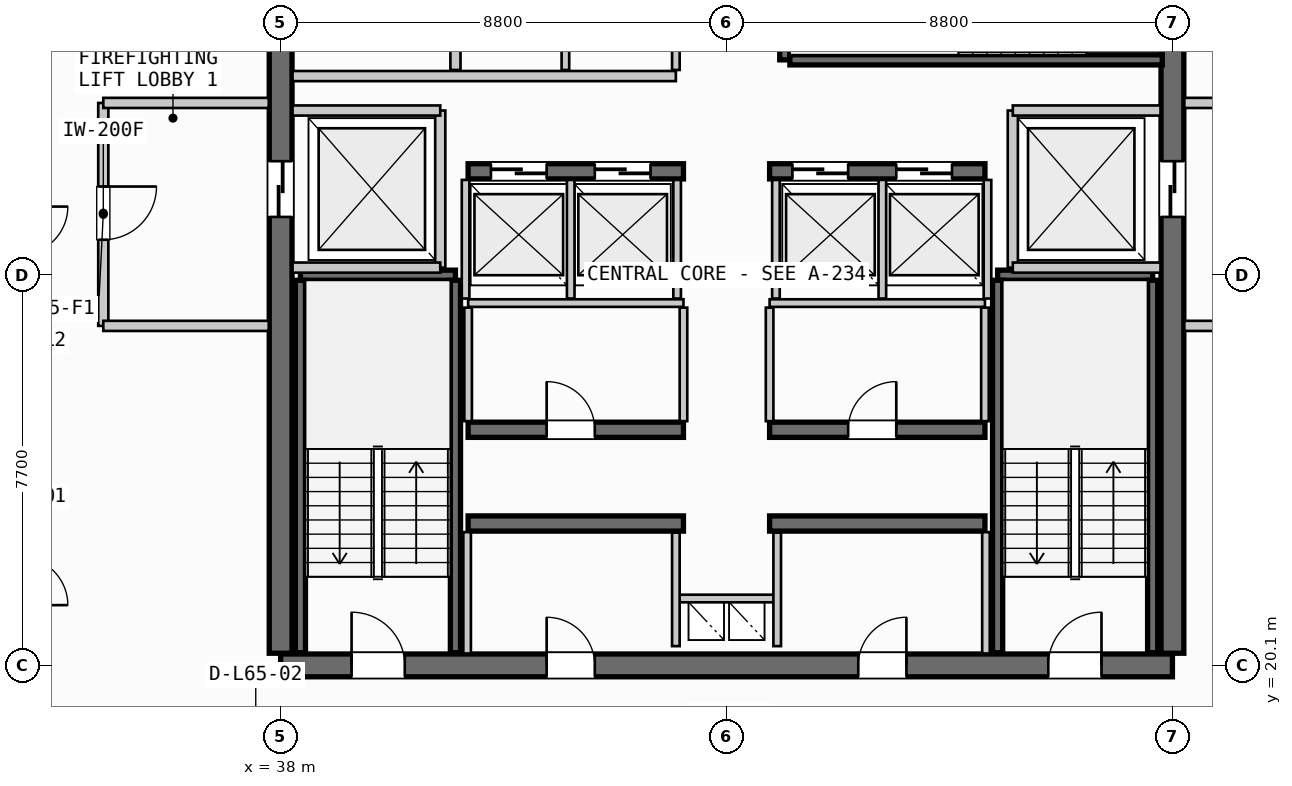
"""IFC4 building model, lengths in metres.
Left out: names, types, materials, properties, quantities, classifications, styles, units other than length and angle.
Written with IfcOpenShell. Run it as: python <this file> out.ifc"""

import sys

from ifc_helpers import new_model, si_unit, direction, frame, frame_2d, origin, place, context, subcontext, project, spatial, rectangle, extrude, source, transform, mapped, element, fill, save


model = new_model("IFC4")
c1 = context("Model", 3, precision=1e-05, world=origin(), true_north=direction((0.0, 1.0)))
c2 = subcontext(c1, "Body", "Model", "MODEL_VIEW")
j1 = project(units=[si_unit("LENGTHUNIT", "METRE"), si_unit("PLANEANGLEUNIT", "RADIAN")], contexts=[c1])
p1 = place(None, origin())
s1 = spatial("IfcSite", under=j1, at=p1, CompositionType="ELEMENT")
p2 = place(p1, origin())
s2 = spatial("IfcBuilding", under=s1, at=p2, CompositionType="ELEMENT")
p3 = place(p2, frame((0.0, 0.0, 249.1)))
s3 = spatial("IfcBuildingStorey", under=s2, at=p3, CompositionType="ELEMENT", Elevation=249.1)
p4 = place(p3, frame((38.0, 20.1, 0.0), z_axis=(0.0, 0.0, 1.0), x_axis=(1.0, 0.0, 0.0)))
e1 = element("IfcWall", 1, at=p4, inside=s3, PredefinedType="SHEAR", context=c2, shape_type="SweptSolid", body=[
    extrude(rectangle(XDim=17.6, YDim=0.45, at=frame_2d((8.8, 0.0))), origin(), (0.0, 0.0, 1.0), 3.21),
])
p5 = place(p4, frame((1.4, 0.0, 0.0)))
e2 = element("IfcOpeningElement", 2, at=p5, cuts=e1, PredefinedType="OPENING", context=c2, shape_type="SweptSolid", body=[
    extrude(rectangle(XDim=1.05, YDim=2.15, at=frame_2d((0.525, 1.075))), frame((0.0, 0.235, 0.0), z_axis=(0.0, -1.0, 0.0), x_axis=(1.0, 0.0, 0.0)), (0.0, 0.0, 1.0), 0.47),
])
p6 = place(p4, frame((15.15, 0.0, 0.0)))
e3 = element("IfcOpeningElement", 3, at=p6, cuts=e1, PredefinedType="OPENING", context=c2, shape_type="SweptSolid", body=[
    extrude(rectangle(XDim=1.05, YDim=2.15, at=frame_2d((0.525, 1.075))), frame((0.0, 0.235, 0.0), z_axis=(0.0, -1.0, 0.0), x_axis=(1.0, 0.0, 0.0)), (0.0, 0.0, 1.0), 0.47),
])
p7 = place(p4, frame((5.25, 0.0, 0.0)))
e4 = element("IfcOpeningElement", 4, at=p7, cuts=e1, PredefinedType="OPENING", context=c2, shape_type="SweptSolid", body=[
    extrude(rectangle(XDim=0.95, YDim=2.15, at=frame_2d((0.475, 1.075))), frame((0.0, 0.235, 0.0), z_axis=(0.0, -1.0, 0.0), x_axis=(1.0, 0.0, 0.0)), (0.0, 0.0, 1.0), 0.47),
])
p8 = place(p4, frame((11.4, 0.0, 0.0)))
e5 = element("IfcOpeningElement", 5, at=p8, cuts=e1, PredefinedType="OPENING", context=c2, shape_type="SweptSolid", body=[
    extrude(rectangle(XDim=0.95, YDim=2.15, at=frame_2d((0.475, 1.075))), frame((0.0, 0.235, 0.0), z_axis=(0.0, -1.0, 0.0), x_axis=(1.0, 0.0, 0.0)), (0.0, 0.0, 1.0), 0.47),
])
p9 = place(p3, frame((38.0, 35.26, 0.0), z_axis=(0.0, 0.0, 1.0), x_axis=(0.0, -1.0, 0.0)))
e6 = element("IfcWall", 6, at=p9, inside=s3, PredefinedType="SHEAR", context=c2, shape_type="SweptSolid", body=[
    extrude(rectangle(XDim=14.92, YDim=0.45, at=frame_2d((7.46, 0.0))), origin(), (0.0, 0.0, 1.0), 3.21),
])
p10 = place(p9, frame((5.21, 0.0, 0.0)))
e7 = element("IfcOpeningElement", 7, at=p10, cuts=e6, PredefinedType="OPENING", context=c2, shape_type="SweptSolid", body=[
    extrude(rectangle(XDim=1.1, YDim=2.2, at=frame_2d((0.55, 1.1))), frame((0.0, 0.235, 0.0), z_axis=(0.0, -1.0, 0.0), x_axis=(1.0, 0.0, 0.0)), (0.0, 0.0, 1.0), 0.47),
])
p11 = place(p3, frame((55.6, 20.34, 0.0), z_axis=(0.0, 0.0, 1.0), x_axis=(0.0, 1.0, 0.0)))
e8 = element("IfcWall", 8, at=p11, inside=s3, PredefinedType="SHEAR", context=c2, shape_type="SweptSolid", body=[
    extrude(rectangle(XDim=14.92, YDim=0.45, at=frame_2d((7.46, 0.0))), origin(), (0.0, 0.0, 1.0), 3.21),
])
p12 = place(p11, frame((12.71, 0.0, 0.0)))
e9 = element("IfcOpeningElement", 9, at=p12, cuts=e8, PredefinedType="OPENING", context=c2, shape_type="SweptSolid", body=[
    extrude(rectangle(XDim=1.05, YDim=2.15, at=frame_2d((0.525, 1.075))), frame((0.0, 0.235, 0.0), z_axis=(0.0, -1.0, 0.0), x_axis=(1.0, 0.0, 0.0)), (0.0, 0.0, 1.0), 0.47),
])
p13 = place(p11, frame((8.61, 0.0, 0.0)))
e10 = element("IfcOpeningElement", 10, at=p13, cuts=e8, PredefinedType="OPENING", context=c2, shape_type="SweptSolid", body=[
    extrude(rectangle(XDim=1.1, YDim=2.2, at=frame_2d((0.55, 1.1))), frame((0.0, 0.235, 0.0), z_axis=(0.0, -1.0, 0.0), x_axis=(1.0, 0.0, 0.0)), (0.0, 0.0, 1.0), 0.47),
])
for number, where, z_axis, x_axis in (
    (11, (41.7, 22.9, 0.0), (0.0, 0.0, 1.0), (1.0, 0.0, 0.0)),
    (12, (47.65, 22.9, 0.0), (0.0, 0.0, 1.0), (1.0, 0.0, 0.0)),
):
    element("IfcWall", number, at=place(p3, frame(where, z_axis=z_axis, x_axis=x_axis)), inside=s3, PredefinedType="SHEAR", context=c2, shape_type="SweptSolid", body=[
        extrude(rectangle(XDim=4.25, YDim=0.3, at=frame_2d((2.125, 0.0))), origin(), (0.0, 0.0, 1.0), 3.21),
    ])
p14 = place(p3, frame((41.7, 24.75, 0.0), z_axis=(0.0, 0.0, 1.0), x_axis=(1.0, 0.0, 0.0)))
e13 = element("IfcWall", 13, at=p14, inside=s3, PredefinedType="SHEAR", context=c2, shape_type="SweptSolid", body=[
    extrude(rectangle(XDim=4.25, YDim=0.3, at=frame_2d((2.125, 0.0))), origin(), (0.0, 0.0, 1.0), 3.21),
])
p15 = place(p14, frame((1.55, 0.0, 0.0)))
e14 = element("IfcOpeningElement", 14, at=p15, cuts=e13, PredefinedType="OPENING", context=c2, shape_type="SweptSolid", body=[
    extrude(rectangle(XDim=0.95, YDim=2.15, at=frame_2d((0.475, 1.075))), frame((0.0, 0.16, 0.0), z_axis=(0.0, -1.0, 0.0), x_axis=(1.0, 0.0, 0.0)), (0.0, 0.0, 1.0), 0.32),
])
p16 = place(p3, frame((47.65, 24.75, 0.0), z_axis=(0.0, 0.0, 1.0), x_axis=(1.0, 0.0, 0.0)))
e15 = element("IfcWall", 15, at=p16, inside=s3, PredefinedType="SHEAR", context=c2, shape_type="SweptSolid", body=[
    extrude(rectangle(XDim=4.25, YDim=0.3, at=frame_2d((2.125, 0.0))), origin(), (0.0, 0.0, 1.0), 3.21),
])
p17 = place(p16, frame((1.55, 0.0, 0.0)))
e16 = element("IfcOpeningElement", 16, at=p17, cuts=e15, PredefinedType="OPENING", context=c2, shape_type="SweptSolid", body=[
    extrude(rectangle(XDim=0.95, YDim=2.15, at=frame_2d((0.475, 1.075))), frame((0.0, 0.16, 0.0), z_axis=(0.0, -1.0, 0.0), x_axis=(1.0, 0.0, 0.0)), (0.0, 0.0, 1.0), 0.32),
])
p18 = place(p3, frame((41.7, 29.85, 0.0), z_axis=(0.0, 0.0, 1.0), x_axis=(1.0, 0.0, 0.0)))
e17 = element("IfcWall", 17, at=p18, inside=s3, PredefinedType="SHEAR", context=c2, shape_type="SweptSolid", body=[
    extrude(rectangle(XDim=4.25, YDim=0.3, at=frame_2d((2.125, 0.0))), origin(), (0.0, 0.0, 1.0), 3.21),
])
p19 = place(p18, frame((0.45, 0.0, 0.0)))
e18 = element("IfcOpeningElement", 18, at=p19, cuts=e17, PredefinedType="OPENING", context=c2, shape_type="SweptSolid", body=[
    extrude(rectangle(XDim=1.1, YDim=2.2, at=frame_2d((0.55, 1.1))), frame((0.0, 0.16, 0.0), z_axis=(0.0, -1.0, 0.0), x_axis=(1.0, 0.0, 0.0)), (0.0, 0.0, 1.0), 0.32),
])
p20 = place(p18, frame((2.5, 0.0, 0.0)))
e19 = element("IfcOpeningElement", 19, at=p20, cuts=e17, PredefinedType="OPENING", context=c2, shape_type="SweptSolid", body=[
    extrude(rectangle(XDim=1.1, YDim=2.2, at=frame_2d((0.55, 1.1))), frame((0.0, 0.16, 0.0), z_axis=(0.0, -1.0, 0.0), x_axis=(1.0, 0.0, 0.0)), (0.0, 0.0, 1.0), 0.32),
])
p21 = place(p3, frame((47.65, 29.85, 0.0), z_axis=(0.0, 0.0, 1.0), x_axis=(1.0, 0.0, 0.0)))
e20 = element("IfcWall", 20, at=p21, inside=s3, PredefinedType="SHEAR", context=c2, shape_type="SweptSolid", body=[
    extrude(rectangle(XDim=4.25, YDim=0.3, at=frame_2d((2.125, 0.0))), origin(), (0.0, 0.0, 1.0), 3.21),
])
p22 = place(p21, frame((0.45, 0.0, 0.0)))
e21 = element("IfcOpeningElement", 21, at=p22, cuts=e20, PredefinedType="OPENING", context=c2, shape_type="SweptSolid", body=[
    extrude(rectangle(XDim=1.1, YDim=2.2, at=frame_2d((0.55, 1.1))), frame((0.0, 0.16, 0.0), z_axis=(0.0, -1.0, 0.0), x_axis=(1.0, 0.0, 0.0)), (0.0, 0.0, 1.0), 0.32),
])
p23 = place(p21, frame((2.5, 0.0, 0.0)))
e22 = element("IfcOpeningElement", 22, at=p23, cuts=e20, PredefinedType="OPENING", context=c2, shape_type="SweptSolid", body=[
    extrude(rectangle(XDim=1.1, YDim=2.2, at=frame_2d((0.55, 1.1))), frame((0.0, 0.16, 0.0), z_axis=(0.0, -1.0, 0.0), x_axis=(1.0, 0.0, 0.0)), (0.0, 0.0, 1.0), 0.32),
])
p24 = place(p3, frame((38.39, 27.8, 0.0), z_axis=(0.0, 0.0, 1.0), x_axis=(1.0, 0.0, 0.0)))
e23 = element("IfcWall", 23, at=p24, inside=s3, PredefinedType="SHEAR", context=c2, shape_type="SweptSolid", body=[
    extrude(rectangle(XDim=3.06, YDim=0.2, at=frame_2d((1.53, 0.0))), origin(), (0.0, 0.0, 1.0), 3.21),
])
for number, where, z_axis, x_axis in (
    (24, (41.45, 27.7, 0.0), (0.0, 0.0, 1.0), (0.0, -1.0, 0.0)),
    (25, (38.39, 20.35, 0.0), (0.0, 0.0, 1.0), (0.0, 1.0, 0.0)),
):
    element("IfcWall", number, at=place(p3, frame(where, z_axis=z_axis, x_axis=x_axis)), inside=s3, PredefinedType="SHEAR", context=c2, shape_type="SweptSolid", body=[
        extrude(rectangle(XDim=7.35, YDim=0.2, at=frame_2d((3.675, 0.0))), origin(), (0.0, 0.0, 1.0), 3.21),
    ])
p25 = place(p3, frame((52.15, 27.8, 0.0), z_axis=(0.0, 0.0, 1.0), x_axis=(1.0, 0.0, 0.0)))
e26 = element("IfcWall", 26, at=p25, inside=s3, PredefinedType="SHEAR", context=c2, shape_type="SweptSolid", body=[
    extrude(rectangle(XDim=3.06, YDim=0.2, at=frame_2d((1.53, 0.0))), origin(), (0.0, 0.0, 1.0), 3.21),
])
for number, where, z_axis, x_axis in (
    (27, (55.21, 27.7, 0.0), (0.0, 0.0, 1.0), (0.0, -1.0, 0.0)),
    (28, (52.15, 20.35, 0.0), (0.0, 0.0, 1.0), (0.0, 1.0, 0.0)),
):
    element("IfcWall", number, at=place(p3, frame(where, z_axis=z_axis, x_axis=x_axis)), inside=s3, PredefinedType="SHEAR", context=c2, shape_type="SweptSolid", body=[
        extrude(rectangle(XDim=7.35, YDim=0.2, at=frame_2d((3.675, 0.0))), origin(), (0.0, 0.0, 1.0), 3.21),
    ])
p26 = place(p3, frame((47.95, 32.05, 0.0), z_axis=(0.0, 0.0, 1.0), x_axis=(0.0, 1.0, 0.0)))
e29 = element("IfcWall", 29, at=p26, inside=s3, PredefinedType="SHEAR", context=c2, shape_type="SweptSolid", body=[
    extrude(rectangle(XDim=3.06, YDim=0.2, at=frame_2d((1.53, 0.0))), origin(), (0.0, 0.0, 1.0), 3.21),
])
p27 = place(p3, frame((55.4, 32.05, 0.0), z_axis=(0.0, 0.0, 1.0), x_axis=(-1.0, 0.0, 0.0)))
e30 = element("IfcWall", 30, at=p27, inside=s3, PredefinedType="SHEAR", context=c2, shape_type="SweptSolid", body=[
    extrude(rectangle(XDim=7.35, YDim=0.2, at=frame_2d((3.675, 0.0))), origin(), (0.0, 0.0, 1.0), 3.21),
])
p28 = place(p3, frame((45.8, 21.42, 0.0), z_axis=(0.0, 0.0, 1.0), x_axis=(1.0, 0.0, 0.0)))
e31 = element("IfcWall", 31, at=p28, inside=s3, PredefinedType="PARTITIONING", context=c2, shape_type="SweptSolid", body=[
    extrude(rectangle(XDim=2.0, YDim=0.15, at=frame_2d((1.0, 0.0))), origin(), (0.0, 0.0, 1.0), 2.28),
])
for number, where, z_axis, x_axis in (
    (32, (45.8, 20.48, 0.0), (0.0, 0.0, 1.0), (0.0, 1.0, 0.0)),
    (33, (47.8, 20.48, 0.0), (0.0, 0.0, 1.0), (0.0, 1.0, 0.0)),
):
    element("IfcWall", number, at=place(p3, frame(where, z_axis=z_axis, x_axis=x_axis)), inside=s3, PredefinedType="PARTITIONING", context=c2, shape_type="SweptSolid", body=[
        extrude(rectangle(XDim=2.24, YDim=0.15, at=frame_2d((1.12, 0.0))), origin(), (0.0, 0.0, 1.0), 2.28),
    ])
p29 = place(p3, frame((41.15, 27.95, 0.0), z_axis=(0.0, 0.0, 1.0), x_axis=(0.0, 1.0, 0.0)))
e34 = element("IfcWall", 34, at=p29, inside=s3, PredefinedType="PARTITIONING", context=c2, shape_type="SweptSolid", body=[
    extrude(rectangle(XDim=3.1, YDim=0.2, at=frame_2d((1.55, 0.0))), origin(), (0.0, 0.0, 1.0), 2.28),
])
for number, where, z_axis, x_axis in (
    (35, (38.235, 27.95, 0.0), (0.0, 0.0, 1.0), (1.0, 0.0, 0.0)),
    (36, (38.235, 31.05, 0.0), (0.0, 0.0, 1.0), (1.0, 0.0, 0.0)),
):
    element("IfcWall", number, at=place(p3, frame(where, z_axis=z_axis, x_axis=x_axis)), inside=s3, PredefinedType="PARTITIONING", context=c2, shape_type="SweptSolid", body=[
        extrude(rectangle(XDim=2.915, YDim=0.2, at=frame_2d((1.458, 0.0))), origin(), (0.0, 0.0, 1.0), 2.28),
    ])
p30 = place(p3, frame((34.5, 31.2, 0.0), z_axis=(0.0, 0.0, 1.0), x_axis=(0.0, -1.0, 0.0)))
e37 = element("IfcWall", 37, at=p30, inside=s3, PredefinedType="PARTITIONING", context=c2, shape_type="SweptSolid", body=[
    extrude(rectangle(XDim=4.4, YDim=0.2, at=frame_2d((2.2, 0.0))), origin(), (0.0, 0.0, 1.0), 2.28),
])
p31 = place(p30, frame((1.65, 0.0, 0.0)))
e38 = element("IfcOpeningElement", 38, at=p31, cuts=e37, PredefinedType="OPENING", context=c2, shape_type="SweptSolid", body=[
    extrude(rectangle(XDim=1.05, YDim=2.15, at=frame_2d((0.525, 1.075))), frame((0.0, 0.11, 0.0), z_axis=(0.0, -1.0, 0.0), x_axis=(1.0, 0.0, 0.0)), (0.0, 0.0, 1.0), 0.22),
])
for number, where, z_axis, x_axis in (
    (39, (34.5, 26.8, 0.0), (0.0, 0.0, 1.0), (1.0, 0.0, 0.0)),
    (40, (34.5, 31.2, 0.0), (0.0, 0.0, 1.0), (1.0, 0.0, 0.0)),
):
    element("IfcWall", number, at=place(p3, frame(where, z_axis=z_axis, x_axis=x_axis)), inside=s3, PredefinedType="PARTITIONING", context=c2, shape_type="SweptSolid", body=[
        extrude(rectangle(XDim=3.265, YDim=0.2, at=frame_2d((1.632, 0.0))), origin(), (0.0, 0.0, 1.0), 2.28),
    ])
p32 = place(p3, frame((52.45, 27.95, 0.0), z_axis=(0.0, 0.0, 1.0), x_axis=(0.0, 1.0, 0.0)))
e41 = element("IfcWall", 41, at=p32, inside=s3, PredefinedType="PARTITIONING", context=c2, shape_type="SweptSolid", body=[
    extrude(rectangle(XDim=3.1, YDim=0.2, at=frame_2d((1.55, 0.0))), origin(), (0.0, 0.0, 1.0), 2.28),
])
for number, where, z_axis, x_axis in (
    (42, (52.45, 27.95, 0.0), (0.0, 0.0, 1.0), (1.0, 0.0, 0.0)),
    (43, (52.45, 31.05, 0.0), (0.0, 0.0, 1.0), (1.0, 0.0, 0.0)),
):
    element("IfcWall", number, at=place(p3, frame(where, z_axis=z_axis, x_axis=x_axis)), inside=s3, PredefinedType="PARTITIONING", context=c2, shape_type="SweptSolid", body=[
        extrude(rectangle(XDim=2.915, YDim=0.2, at=frame_2d((1.458, 0.0))), origin(), (0.0, 0.0, 1.0), 2.28),
    ])
for number, where, z_axis, x_axis in (
    (44, (55.835, 26.8, 0.0), (0.0, 0.0, 1.0), (1.0, 0.0, 0.0)),
    (45, (55.835, 31.2, 0.0), (0.0, 0.0, 1.0), (1.0, 0.0, 0.0)),
):
    element("IfcWall", number, at=place(p3, frame(where, z_axis=z_axis, x_axis=x_axis)), inside=s3, PredefinedType="PARTITIONING", context=c2, shape_type="SweptSolid", body=[
        extrude(rectangle(XDim=3.265, YDim=0.2, at=frame_2d((1.633, 0.0))), origin(), (0.0, 0.0, 1.0), 2.28),
    ])
for number, where, z_axis, x_axis in (
    (46, (41.68, 20.335, 0.0), (0.0, 0.0, 1.0), (0.0, 1.0, 0.0)),
    (47, (51.92, 20.335, 0.0), (0.0, 0.0, 1.0), (0.0, 1.0, 0.0)),
):
    element("IfcWall", number, at=place(p3, frame(where, z_axis=z_axis, x_axis=x_axis)), inside=s3, PredefinedType="PARTITIONING", context=c2, shape_type="SweptSolid", body=[
        extrude(rectangle(XDim=2.395, YDim=0.15, at=frame_2d((1.198, 0.0))), origin(), (0.0, 0.0, 1.0), 2.28),
    ])
for number, where, z_axis, x_axis in (
    (48, (41.7, 27.25, 0.0), (0.0, 0.0, 1.0), (1.0, 0.0, 0.0)),
    (49, (47.65, 27.25, 0.0), (0.0, 0.0, 1.0), (1.0, 0.0, 0.0)),
):
    element("IfcWall", number, at=place(p3, frame(where, z_axis=z_axis, x_axis=x_axis)), inside=s3, PredefinedType="PARTITIONING", context=c2, shape_type="SweptSolid", body=[
        extrude(rectangle(XDim=4.25, YDim=0.15, at=frame_2d((2.125, 0.0))), origin(), (0.0, 0.0, 1.0), 2.28),
    ])
for number, where, z_axis, x_axis in (
    (50, (41.7, 24.92, 0.0), (0.0, 0.0, 1.0), (0.0, 1.0, 0.0)),
    (51, (45.95, 24.92, 0.0), (0.0, 0.0, 1.0), (0.0, 1.0, 0.0)),
    (52, (47.65, 24.92, 0.0), (0.0, 0.0, 1.0), (0.0, 1.0, 0.0)),
    (53, (51.9, 24.92, 0.0), (0.0, 0.0, 1.0), (0.0, 1.0, 0.0)),
):
    element("IfcWall", number, at=place(p3, frame(where, z_axis=z_axis, x_axis=x_axis)), inside=s3, PredefinedType="PARTITIONING", context=c2, shape_type="SweptSolid", body=[
        extrude(rectangle(XDim=2.24, YDim=0.15, at=frame_2d((1.12, 0.0))), origin(), (0.0, 0.0, 1.0), 2.28),
    ])
for number, where, z_axis, x_axis in (
    (54, (41.65, 27.34, 0.0), (0.0, 0.0, 1.0), (0.0, 1.0, 0.0)),
    (55, (43.725, 27.34, 0.0), (0.0, 0.0, 1.0), (0.0, 1.0, 0.0)),
    (56, (45.825, 27.34, 0.0), (0.0, 0.0, 1.0), (0.0, 1.0, 0.0)),
    (57, (47.775, 27.34, 0.0), (0.0, 0.0, 1.0), (0.0, 1.0, 0.0)),
    (58, (49.875, 27.34, 0.0), (0.0, 0.0, 1.0), (0.0, 1.0, 0.0)),
    (59, (51.95, 27.34, 0.0), (0.0, 0.0, 1.0), (0.0, 1.0, 0.0)),
):
    element("IfcWall", number, at=place(p3, frame(where, z_axis=z_axis, x_axis=x_axis)), inside=s3, PredefinedType="PARTITIONING", context=c2, shape_type="SweptSolid", body=[
        extrude(rectangle(XDim=2.34, YDim=0.15, at=frame_2d((1.17, 0.0))), origin(), (0.0, 0.0, 1.0), 2.28),
    ])
p33 = place(p3, frame((41.45, 31.85, 0.0), z_axis=(0.0, 0.0, 1.0), x_axis=(0.0, 1.0, 0.0)))
e60 = element("IfcWall", 60, at=p33, inside=s3, PredefinedType="PARTITIONING", context=c2, shape_type="SweptSolid", body=[
    extrude(rectangle(XDim=3.415, YDim=0.2, at=frame_2d((1.708, 0.0))), origin(), (0.0, 0.0, 1.0), 2.28),
])
p34 = place(p3, frame((38.235, 31.73, 0.0), z_axis=(0.0, 0.0, 1.0), x_axis=(1.0, 0.0, 0.0)))
e61 = element("IfcWall", 61, at=p34, inside=s3, PredefinedType="PARTITIONING", context=c2, shape_type="SweptSolid", body=[
    extrude(rectangle(XDim=7.565, YDim=0.2, at=frame_2d((3.782, 0.0))), origin(), (0.0, 0.0, 1.0), 2.28),
])
p35 = place(p3, frame((45.8, 31.85, 0.0), z_axis=(0.0, 0.0, 1.0), x_axis=(0.0, 1.0, 0.0)))
e62 = element("IfcWall", 62, at=p35, inside=s3, PredefinedType="PARTITIONING", context=c2, shape_type="SweptSolid", body=[
    extrude(rectangle(XDim=3.415, YDim=0.15, at=frame_2d((1.708, 0.0))), origin(), (0.0, 0.0, 1.0), 2.28),
])
p36 = place(p3, frame((43.62, 31.85, 0.0), z_axis=(0.0, 0.0, 1.0), x_axis=(0.0, 1.0, 0.0)))
e63 = element("IfcWall", 63, at=p36, inside=s3, PredefinedType="PLUMBINGWALL", context=c2, shape_type="SweptSolid", body=[
    extrude(rectangle(XDim=3.415, YDim=0.15, at=frame_2d((1.708, 0.0))), origin(), (0.0, 0.0, 1.0), 2.28),
])
m1 = source(origin(), c2, "Body", "SweptSolid", [
    extrude(rectangle(XDim=1.05, YDim=2.15, at=frame_2d((0.525, 1.075))), frame((0.0, 0.025, 0.0), z_axis=(0.0, -1.0, 0.0), x_axis=(1.0, 0.0, 0.0)), (0.0, 0.0, 1.0), 0.05),
])
p37 = place(p5, origin())
e64 = element("IfcDoor", 64, at=p37, inside=s3, OperationType="SINGLE_SWING_LEFT", PredefinedType="DOOR", context=c2, shape_type="MappedRepresentation", body=[
    mapped(m1, transform((0.0, 0.0, 0.0), scale=1.0)),
])
fill(e2, e64)
p38 = place(p6, origin())
e65 = element("IfcDoor", 65, at=p38, inside=s3, OperationType="SINGLE_SWING_RIGHT", PredefinedType="DOOR", context=c2, shape_type="MappedRepresentation", body=[
    mapped(m1, transform((0.0, 0.0, 0.0), scale=1.0)),
])
fill(e3, e65)
m2 = source(origin(), c2, "Body", "SweptSolid", [
    extrude(rectangle(XDim=1.1, YDim=2.2, at=frame_2d((0.55, 1.1))), frame((0.0, 0.025, 0.0), z_axis=(0.0, -1.0, 0.0), x_axis=(1.0, 0.0, 0.0)), (0.0, 0.0, 1.0), 0.05),
])
p39 = place(p10, origin())
e66 = element("IfcDoor", 66, at=p39, inside=s3, OperationType="SLIDING_TO_LEFT", PredefinedType="DOOR", context=c2, shape_type="MappedRepresentation", body=[
    mapped(m2, transform((0.0, 0.0, 0.0), scale=1.0)),
])
fill(e7, e66)
p40 = place(p13, origin())
e67 = element("IfcDoor", 67, at=p40, inside=s3, OperationType="SLIDING_TO_RIGHT", PredefinedType="DOOR", context=c2, shape_type="MappedRepresentation", body=[
    mapped(m2, transform((0.0, 0.0, 0.0), scale=1.0)),
])
fill(e10, e67)
m3 = source(origin(), c2, "Body", "SweptSolid", [
    extrude(rectangle(XDim=0.95, YDim=2.15, at=frame_2d((0.475, 1.075))), frame((0.0, 0.025, 0.0), z_axis=(0.0, -1.0, 0.0), x_axis=(1.0, 0.0, 0.0)), (0.0, 0.0, 1.0), 0.05),
])
p41 = place(p7, origin())
e68 = element("IfcDoor", 68, at=p41, inside=s3, OperationType="SINGLE_SWING_LEFT", PredefinedType="DOOR", context=c2, shape_type="MappedRepresentation", body=[
    mapped(m3, transform((0.0, 0.0, 0.0), scale=1.0)),
])
fill(e4, e68)
p42 = place(p8, origin())
e69 = element("IfcDoor", 69, at=p42, inside=s3, OperationType="SINGLE_SWING_RIGHT", PredefinedType="DOOR", context=c2, shape_type="MappedRepresentation", body=[
    mapped(m3, transform((0.0, 0.0, 0.0), scale=1.0)),
])
fill(e5, e69)
p43 = place(p15, origin())
e70 = element("IfcDoor", 70, at=p43, inside=s3, OperationType="SINGLE_SWING_LEFT", PredefinedType="DOOR", context=c2, shape_type="MappedRepresentation", body=[
    mapped(m3, transform((0.0, 0.0, 0.0), scale=1.0)),
])
fill(e14, e70)
p44 = place(p17, origin())
e71 = element("IfcDoor", 71, at=p44, inside=s3, OperationType="SINGLE_SWING_RIGHT", PredefinedType="DOOR", context=c2, shape_type="MappedRepresentation", body=[
    mapped(m3, transform((0.0, 0.0, 0.0), scale=1.0)),
])
fill(e16, e71)
p45 = place(p19, origin())
e72 = element("IfcDoor", 72, at=p45, inside=s3, OperationType="SLIDING_TO_LEFT", PredefinedType="DOOR", context=c2, shape_type="MappedRepresentation", body=[
    mapped(m2, transform((0.0, 0.0, 0.0), scale=1.0)),
])
fill(e18, e72)
p46 = place(p20, origin())
e73 = element("IfcDoor", 73, at=p46, inside=s3, OperationType="SLIDING_TO_LEFT", PredefinedType="DOOR", context=c2, shape_type="MappedRepresentation", body=[
    mapped(m2, transform((0.0, 0.0, 0.0), scale=1.0)),
])
fill(e19, e73)
p47 = place(p22, origin())
e74 = element("IfcDoor", 74, at=p47, inside=s3, OperationType="SLIDING_TO_LEFT", PredefinedType="DOOR", context=c2, shape_type="MappedRepresentation", body=[
    mapped(m2, transform((0.0, 0.0, 0.0), scale=1.0)),
])
fill(e21, e74)
p48 = place(p23, origin())
e75 = element("IfcDoor", 75, at=p48, inside=s3, OperationType="SLIDING_TO_LEFT", PredefinedType="DOOR", context=c2, shape_type="MappedRepresentation", body=[
    mapped(m2, transform((0.0, 0.0, 0.0), scale=1.0)),
])
fill(e22, e75)
p49 = place(p31, origin())
e76 = element("IfcDoor", 76, at=p49, inside=s3, OperationType="SINGLE_SWING_LEFT", PredefinedType="DOOR", context=c2, shape_type="MappedRepresentation", body=[
    mapped(m1, transform((0.0, 0.0, 0.0), scale=1.0)),
])
fill(e38, e76)
save(model, sys.argv[1])
